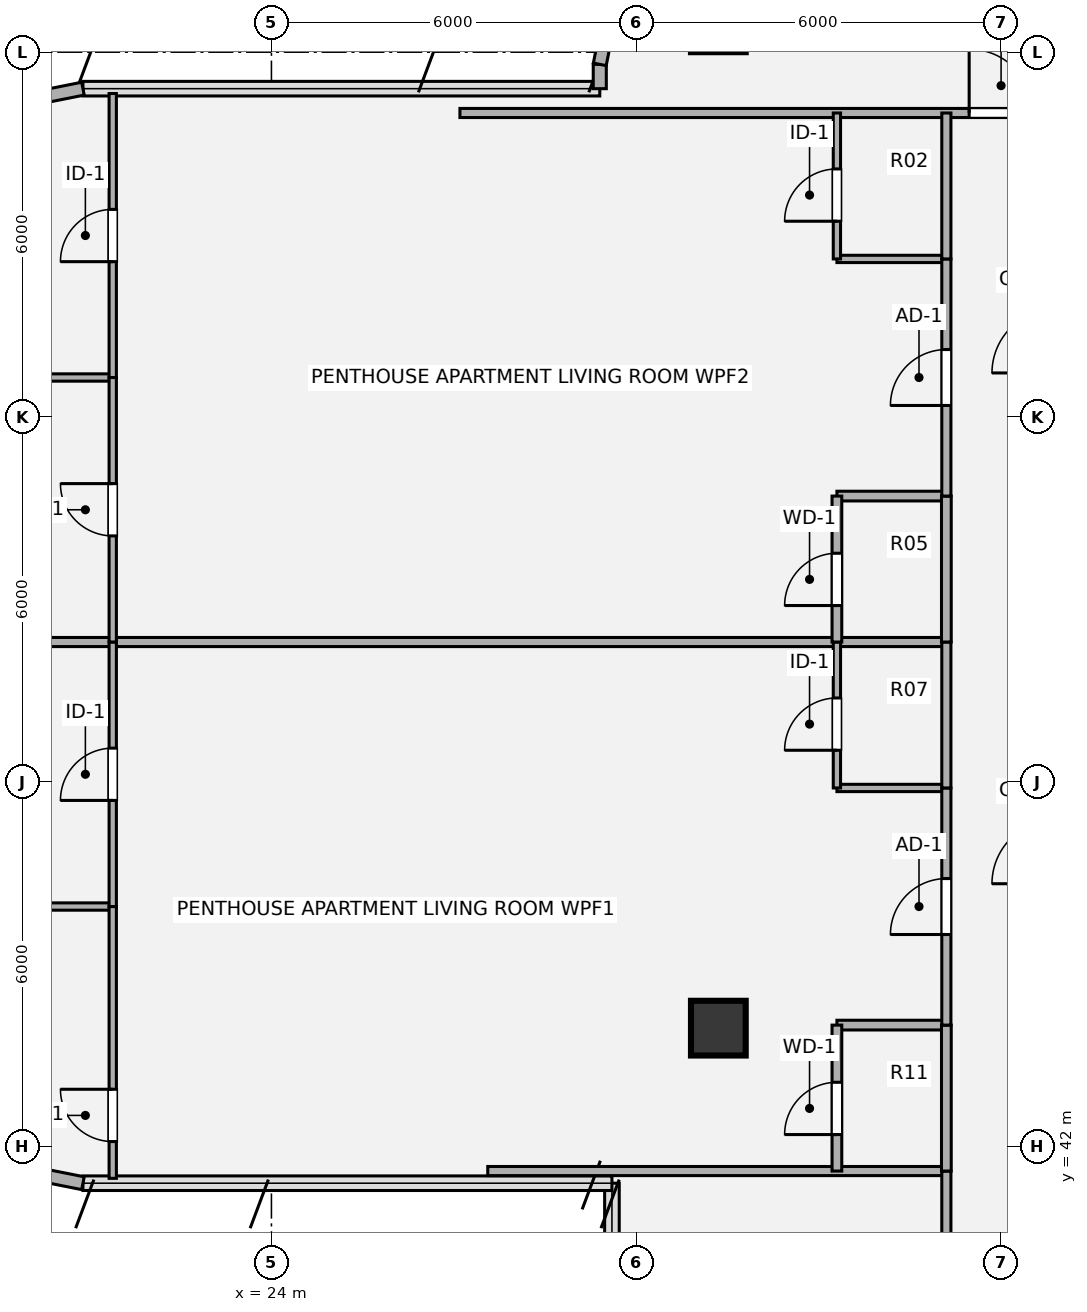
"""IFC4 building model, lengths in metres.
Left out: names, types, materials, properties, quantities, classifications, styles, units other than length and angle.
Written with IfcOpenShell. Run it as: python <this file> out.ifc"""

import sys

from ifc_helpers import new_model, si_unit, direction, frame, frame_2d, origin, origin_2d, place, context, subcontext, project, spatial, rectangle, hollow_circle, extrude, source, transform, mapped, element, fill, save


model = new_model("IFC4")
c1 = context("Model", 3, precision=1e-05, world=origin(), true_north=direction((0.0, 1.0)))
c2 = subcontext(c1, "Body", "Model", "MODEL_VIEW")
j1 = project(units=[si_unit("LENGTHUNIT", "METRE"), si_unit("PLANEANGLEUNIT", "RADIAN")], contexts=[c1])
p1 = place(None, origin())
s1 = spatial("IfcSite", under=j1, at=p1, CompositionType="ELEMENT")
p2 = place(p1, origin())
s2 = spatial("IfcBuilding", under=s1, at=p2, CompositionType="ELEMENT")
p3 = place(p2, frame((0.0, 0.0, 279.72)))
s3 = spatial("IfcBuildingStorey", under=s2, at=p3, CompositionType="ELEMENT", Elevation=279.72)
m1 = source(origin(), c2, "Body", "SweptSolid", [
    extrude(hollow_circle(Radius=0.45, WallThickness=0.032, at=origin_2d()), origin(), (0.0, 0.0, 1.0), 3.78),
])
p4 = place(p3, frame((31.35, 43.95, 0.0), z_axis=(0.0, 0.0, 1.0), x_axis=(1.0, 0.0, 0.0)))
e1 = element("IfcColumn", 1, at=p4, inside=s3, PredefinedType="COLUMN", context=c2, shape_type="MappedRepresentation", body=[
    mapped(m1, transform((0.0, 0.0, 0.0), x_axis=(1.0, 0.0, 0.0), y_axis=(0.0, 1.0, 0.0), z_axis=(0.0, 0.0, 1.0), scale=1.0)),
])
for number, where, z_axis, x_axis in (
    (2, (20.9, 41.4, 0.0), (0.0, 0.0, 1.0), (-0.981, 0.195, 0.0)),
    (3, (19.675, 59.156, 0.0), (0.0, 0.0, 1.0), (0.981, 0.195, 0.0)),
):
    element("IfcWall", number, at=place(p3, frame(where, z_axis=z_axis, x_axis=x_axis)), inside=s3, PredefinedType="SOLIDWALL", context=c2, shape_type="SweptSolid", body=[
        extrude(rectangle(XDim=1.249, YDim=0.215, at=frame_2d((0.624, 0.0))), origin(), (0.0, 0.0, 1.0), 3.53),
    ])
p5 = place(p3, frame((29.4, 59.4, 0.0), z_axis=(0.0, 0.0, 1.0), x_axis=(0.0, 1.0, 0.0)))
e4 = element("IfcWall", 4, at=p5, inside=s3, PredefinedType="SOLIDWALL", context=c2, shape_type="SweptSolid", body=[
    extrude(rectangle(XDim=0.4, YDim=0.215, at=frame_2d((0.2, 0.0))), origin(), (0.0, 0.0, 1.0), 3.53),
])
p6 = place(p3, frame((29.4, 59.8, 0.0), z_axis=(0.0, 0.0, 1.0), x_axis=(0.195190360752, 0.980765376158, 0.0)))
e5 = element("IfcWall", 5, at=p6, inside=s3, PredefinedType="SOLIDWALL", context=c2, shape_type="SweptSolid", body=[
    extrude(rectangle(XDim=1.014, YDim=0.215, at=frame_2d((0.507, 0.0))), origin(), (0.0, 0.0, 1.0), 3.53),
])
p7 = place(p3, frame((27.558, 41.6, 0.0), z_axis=(0.0, 0.0, 1.0), x_axis=(1.0, 0.0, 0.0)))
e6 = element("IfcWall", 6, at=p7, inside=s3, PredefinedType="PARTITIONING", context=c2, shape_type="SweptSolid", body=[
    extrude(rectangle(XDim=7.542, YDim=0.15, at=frame_2d((3.771, 0.0))), origin(), (0.0, 0.0, 1.0), 3.5),
])
p8 = place(p3, frame((33.3, 44.0, 0.0), z_axis=(0.0, 0.0, 1.0), x_axis=(1.0, 0.0, 0.0)))
e7 = element("IfcWall", 7, at=p8, inside=s3, PredefinedType="PLUMBINGWALL", context=c2, shape_type="SweptSolid", body=[
    extrude(rectangle(XDim=1.8, YDim=0.16, at=frame_2d((0.9, 0.0))), origin(), (0.0, 0.0, 1.0), 2.903),
])
p9 = place(p3, frame((17.78, 45.95, 0.0), z_axis=(0.0, 0.0, 1.0), x_axis=(1.0, 0.0, 0.0)))
e8 = element("IfcWall", 8, at=p9, inside=s3, PredefinedType="PARTITIONING", context=c2, shape_type="SweptSolid", body=[
    extrude(rectangle(XDim=3.61, YDim=0.12, at=frame_2d((1.805, 0.0))), origin(), (0.0, 0.0, 1.0), 2.982),
])
p10 = place(p3, frame((33.3, 47.9, 0.0), z_axis=(0.0, 0.0, 1.0), x_axis=(1.0, 0.0, 0.0)))
e9 = element("IfcWall", 9, at=p10, inside=s3, PredefinedType="PARTITIONING", context=c2, shape_type="SweptSolid", body=[
    extrude(rectangle(XDim=1.8, YDim=0.12, at=frame_2d((0.9, 0.0))), origin(), (0.0, 0.0, 1.0), 3.259),
])
p11 = place(p3, frame((17.78, 50.3, 0.0), z_axis=(0.0, 0.0, 1.0), x_axis=(1.0, 0.0, 0.0)))
e10 = element("IfcWall", 10, at=p11, inside=s3, PredefinedType="PARTITIONING", context=c2, shape_type="SweptSolid", body=[
    extrude(rectangle(XDim=17.32, YDim=0.15, at=frame_2d((8.66, 0.0))), origin(), (0.0, 0.0, 1.0), 2.982),
])
p12 = place(p3, frame((33.3, 52.7, 0.0), z_axis=(0.0, 0.0, 1.0), x_axis=(1.0, 0.0, 0.0)))
e11 = element("IfcWall", 11, at=p12, inside=s3, PredefinedType="PLUMBINGWALL", context=c2, shape_type="SweptSolid", body=[
    extrude(rectangle(XDim=1.8, YDim=0.16, at=frame_2d((0.9, 0.0))), origin(), (0.0, 0.0, 1.0), 3.259),
])
p13 = place(p3, frame((17.78, 54.65, 0.0), z_axis=(0.0, 0.0, 1.0), x_axis=(1.0, 0.0, 0.0)))
e12 = element("IfcWall", 12, at=p13, inside=s3, PredefinedType="PARTITIONING", context=c2, shape_type="SweptSolid", body=[
    extrude(rectangle(XDim=3.61, YDim=0.12, at=frame_2d((1.805, 0.0))), origin(), (0.0, 0.0, 1.0), 2.903),
])
p14 = place(p3, frame((33.3, 56.6, 0.0), z_axis=(0.0, 0.0, 1.0), x_axis=(1.0, 0.0, 0.0)))
e13 = element("IfcWall", 13, at=p14, inside=s3, PredefinedType="PARTITIONING", context=c2, shape_type="SweptSolid", body=[
    extrude(rectangle(XDim=1.8, YDim=0.12, at=frame_2d((0.9, 0.0))), origin(), (0.0, 0.0, 1.0), 3.259),
])
p15 = place(p3, frame((27.1, 59.0, 0.0), z_axis=(0.0, 0.0, 1.0), x_axis=(1.0, 0.0, 0.0)))
e14 = element("IfcWall", 14, at=p15, inside=s3, PredefinedType="PARTITIONING", context=c2, shape_type="SweptSolid", body=[
    extrude(rectangle(XDim=17.8, YDim=0.15, at=frame_2d((8.9, 0.0))), origin(), (0.0, 0.0, 1.0), 3.308),
])
p16 = place(p15, frame((8.375, 0.0, 0.0)))
e15 = element("IfcOpeningElement", 15, at=p16, cuts=e14, PredefinedType="OPENING", context=c2, shape_type="SweptSolid", body=[
    extrude(rectangle(XDim=1.05, YDim=2.1, at=origin_2d()), frame((0.525, 0.085, 1.05), z_axis=(0.0, -1.0, 0.0), x_axis=(1.0, 0.0, 0.0)), (0.0, 0.0, 1.0), 0.17),
])
p17 = place(p3, frame((21.39, 41.48, 0.0), z_axis=(0.0, 0.0, 1.0), x_axis=(0.0, 1.0, 0.0)))
e16 = element("IfcWall", 16, at=p17, inside=s3, PredefinedType="PARTITIONING", context=c2, shape_type="SweptSolid", body=[
    extrude(rectangle(XDim=4.47, YDim=0.12, at=frame_2d((2.235, 0.0))), origin(), (0.0, 0.0, 1.0), 3.5),
])
p18 = place(p17, frame((0.605, 0.0, 0.0)))
e17 = element("IfcOpeningElement", 17, at=p18, cuts=e16, PredefinedType="OPENING", context=c2, shape_type="SweptSolid", body=[
    extrude(rectangle(XDim=0.86, YDim=2.1, at=origin_2d()), frame((0.43, 0.07, 1.05), z_axis=(0.0, -1.0, 0.0), x_axis=(1.0, 0.0, 0.0)), (0.0, 0.0, 1.0), 0.14),
])
p19 = place(p3, frame((21.39, 45.95, 0.0), z_axis=(0.0, 0.0, 1.0), x_axis=(0.0, 1.0, 0.0)))
e18 = element("IfcWall", 18, at=p19, inside=s3, PredefinedType="PARTITIONING", context=c2, shape_type="SweptSolid", body=[
    extrude(rectangle(XDim=4.35, YDim=0.12, at=frame_2d((2.175, 0.0))), origin(), (0.0, 0.0, 1.0), 3.5),
])
p20 = place(p19, frame((1.745, 0.0, 0.0)))
e19 = element("IfcOpeningElement", 19, at=p20, cuts=e18, PredefinedType="OPENING", context=c2, shape_type="SweptSolid", body=[
    extrude(rectangle(XDim=0.86, YDim=2.1, at=origin_2d()), frame((0.43, 0.07, 1.05), z_axis=(0.0, -1.0, 0.0), x_axis=(1.0, 0.0, 0.0)), (0.0, 0.0, 1.0), 0.14),
])
p21 = place(p3, frame((21.39, 50.3, 0.0), z_axis=(0.0, 0.0, 1.0), x_axis=(0.0, 1.0, 0.0)))
e20 = element("IfcWall", 20, at=p21, inside=s3, PredefinedType="PARTITIONING", context=c2, shape_type="SweptSolid", body=[
    extrude(rectangle(XDim=4.35, YDim=0.12, at=frame_2d((2.175, 0.0))), origin(), (0.0, 0.0, 1.0), 3.5),
])
p22 = place(p21, frame((1.745, 0.0, 0.0)))
e21 = element("IfcOpeningElement", 21, at=p22, cuts=e20, PredefinedType="OPENING", context=c2, shape_type="SweptSolid", body=[
    extrude(rectangle(XDim=0.86, YDim=2.1, at=origin_2d()), frame((0.43, 0.07, 1.05), z_axis=(0.0, -1.0, 0.0), x_axis=(1.0, 0.0, 0.0)), (0.0, 0.0, 1.0), 0.14),
])
p23 = place(p3, frame((21.39, 54.65, 0.0), z_axis=(0.0, 0.0, 1.0), x_axis=(0.0, 1.0, 0.0)))
e22 = element("IfcWall", 22, at=p23, inside=s3, PredefinedType="PARTITIONING", context=c2, shape_type="SweptSolid", body=[
    extrude(rectangle(XDim=4.67, YDim=0.12, at=frame_2d((2.335, 0.0))), origin(), (0.0, 0.0, 1.0), 3.5),
])
p24 = place(p23, frame((1.905, 0.0, 0.0)))
e23 = element("IfcOpeningElement", 23, at=p24, cuts=e22, PredefinedType="OPENING", context=c2, shape_type="SweptSolid", body=[
    extrude(rectangle(XDim=0.86, YDim=2.1, at=origin_2d()), frame((0.43, 0.07, 1.05), z_axis=(0.0, -1.0, 0.0), x_axis=(1.0, 0.0, 0.0)), (0.0, 0.0, 1.0), 0.14),
])
p25 = place(p3, frame((33.3, 41.6, 0.0), z_axis=(0.0, 0.0, 1.0), x_axis=(0.0, 1.0, 0.0)))
e24 = element("IfcWall", 24, at=p25, inside=s3, PredefinedType="PLUMBINGWALL", context=c2, shape_type="SweptSolid", body=[
    extrude(rectangle(XDim=2.4, YDim=0.16, at=frame_2d((1.2, 0.0))), origin(), (0.0, 0.0, 1.0), 3.5),
])
p26 = place(p25, frame((0.6, 0.0, 0.0)))
e25 = element("IfcOpeningElement", 25, at=p26, cuts=e24, PredefinedType="OPENING", context=c2, shape_type="SweptSolid", body=[
    extrude(rectangle(XDim=0.86, YDim=2.1, at=origin_2d()), frame((0.43, 0.09, 1.05), z_axis=(0.0, -1.0, 0.0), x_axis=(1.0, 0.0, 0.0)), (0.0, 0.0, 1.0), 0.18),
])
p27 = place(p3, frame((33.3, 47.9, 0.0), z_axis=(0.0, 0.0, 1.0), x_axis=(0.0, 1.0, 0.0)))
e26 = element("IfcWall", 26, at=p27, inside=s3, PredefinedType="PARTITIONING", context=c2, shape_type="SweptSolid", body=[
    extrude(rectangle(XDim=2.4, YDim=0.12, at=frame_2d((1.2, 0.0))), origin(), (0.0, 0.0, 1.0), 3.5),
])
p28 = place(p27, frame((0.62, 0.0, 0.0)))
e27 = element("IfcOpeningElement", 27, at=p28, cuts=e26, PredefinedType="OPENING", context=c2, shape_type="SweptSolid", body=[
    extrude(rectangle(XDim=0.86, YDim=2.1, at=origin_2d()), frame((0.43, 0.07, 1.05), z_axis=(0.0, -1.0, 0.0), x_axis=(1.0, 0.0, 0.0)), (0.0, 0.0, 1.0), 0.14),
])
p29 = place(p3, frame((33.3, 50.3, 0.0), z_axis=(0.0, 0.0, 1.0), x_axis=(0.0, 1.0, 0.0)))
e28 = element("IfcWall", 28, at=p29, inside=s3, PredefinedType="PLUMBINGWALL", context=c2, shape_type="SweptSolid", body=[
    extrude(rectangle(XDim=2.4, YDim=0.16, at=frame_2d((1.2, 0.0))), origin(), (0.0, 0.0, 1.0), 3.5),
])
p30 = place(p29, frame((0.6, 0.0, 0.0)))
e29 = element("IfcOpeningElement", 29, at=p30, cuts=e28, PredefinedType="OPENING", context=c2, shape_type="SweptSolid", body=[
    extrude(rectangle(XDim=0.86, YDim=2.1, at=origin_2d()), frame((0.43, 0.09, 1.05), z_axis=(0.0, -1.0, 0.0), x_axis=(1.0, 0.0, 0.0)), (0.0, 0.0, 1.0), 0.18),
])
p31 = place(p3, frame((33.3, 56.6, 0.0), z_axis=(0.0, 0.0, 1.0), x_axis=(0.0, 1.0, 0.0)))
e30 = element("IfcWall", 30, at=p31, inside=s3, PredefinedType="PARTITIONING", context=c2, shape_type="SweptSolid", body=[
    extrude(rectangle(XDim=2.4, YDim=0.12, at=frame_2d((1.2, 0.0))), origin(), (0.0, 0.0, 1.0), 3.5),
])
p32 = place(p31, frame((0.62, 0.0, 0.0)))
e31 = element("IfcOpeningElement", 31, at=p32, cuts=e30, PredefinedType="OPENING", context=c2, shape_type="SweptSolid", body=[
    extrude(rectangle(XDim=0.86, YDim=2.1, at=origin_2d()), frame((0.43, 0.07, 1.05), z_axis=(0.0, -1.0, 0.0), x_axis=(1.0, 0.0, 0.0)), (0.0, 0.0, 1.0), 0.14),
])
p33 = place(p3, frame((35.1, 24.4, 0.0), z_axis=(0.0, 0.0, 1.0), x_axis=(0.0, 1.0, 0.0)))
e32 = element("IfcWall", 32, at=p33, inside=s3, PredefinedType="PARTITIONING", context=c2, shape_type="SweptSolid", body=[
    extrude(rectangle(XDim=17.2, YDim=0.15, at=frame_2d((8.6, 0.0))), origin(), (0.0, 0.0, 1.0), 3.5),
])
p34 = place(p33, frame((5.075, 0.0, 0.0)))
e33 = element("IfcOpeningElement", 33, at=p34, cuts=e32, PredefinedType="OPENING", context=c2, shape_type="SweptSolid", body=[
    extrude(rectangle(XDim=1.05, YDim=2.1, at=origin_2d()), frame((0.525, 0.085, 1.05), z_axis=(0.0, -1.0, 0.0), x_axis=(1.0, 0.0, 0.0)), (0.0, 0.0, 1.0), 0.17),
])
p35 = place(p3, frame((35.1, 41.6, 0.0), z_axis=(0.0, 0.0, 1.0), x_axis=(0.0, 1.0, 0.0)))
e34 = element("IfcWall", 34, at=p35, inside=s3, PredefinedType="PLUMBINGWALL", context=c2, shape_type="SweptSolid", body=[
    extrude(rectangle(XDim=2.4, YDim=0.16, at=frame_2d((1.2, 0.0))), origin(), (0.0, 0.0, 1.0), 3.5),
])
p36 = place(p3, frame((35.1, 44.0, 0.0), z_axis=(0.0, 0.0, 1.0), x_axis=(0.0, 1.0, 0.0)))
e35 = element("IfcWall", 35, at=p36, inside=s3, PredefinedType="PARTITIONING", context=c2, shape_type="SweptSolid", body=[
    extrude(rectangle(XDim=3.9, YDim=0.15, at=frame_2d((1.95, 0.0))), origin(), (0.0, 0.0, 1.0), 3.5),
])
p37 = place(p36, frame((1.49, 0.0, 0.0)))
e36 = element("IfcOpeningElement", 36, at=p37, cuts=e35, PredefinedType="OPENING", context=c2, shape_type="SweptSolid", body=[
    extrude(rectangle(XDim=0.92, YDim=2.1, at=origin_2d()), frame((0.46, 0.085, 1.05), z_axis=(0.0, -1.0, 0.0), x_axis=(1.0, 0.0, 0.0)), (0.0, 0.0, 1.0), 0.17),
])
p38 = place(p3, frame((35.1, 47.9, 0.0), z_axis=(0.0, 0.0, 1.0), x_axis=(0.0, 1.0, 0.0)))
e37 = element("IfcWall", 37, at=p38, inside=s3, PredefinedType="PARTITIONING", context=c2, shape_type="SweptSolid", body=[
    extrude(rectangle(XDim=2.4, YDim=0.15, at=frame_2d((1.2, 0.0))), origin(), (0.0, 0.0, 1.0), 3.5),
])
p39 = place(p3, frame((35.1, 50.3, 0.0), z_axis=(0.0, 0.0, 1.0), x_axis=(0.0, 1.0, 0.0)))
e38 = element("IfcWall", 38, at=p39, inside=s3, PredefinedType="PLUMBINGWALL", context=c2, shape_type="SweptSolid", body=[
    extrude(rectangle(XDim=2.4, YDim=0.16, at=frame_2d((1.2, 0.0))), origin(), (0.0, 0.0, 1.0), 3.5),
])
p40 = place(p3, frame((35.1, 52.7, 0.0), z_axis=(0.0, 0.0, 1.0), x_axis=(0.0, 1.0, 0.0)))
e39 = element("IfcWall", 39, at=p40, inside=s3, PredefinedType="PARTITIONING", context=c2, shape_type="SweptSolid", body=[
    extrude(rectangle(XDim=3.9, YDim=0.15, at=frame_2d((1.95, 0.0))), origin(), (0.0, 0.0, 1.0), 3.5),
])
p41 = place(p40, frame((1.49, 0.0, 0.0)))
e40 = element("IfcOpeningElement", 40, at=p41, cuts=e39, PredefinedType="OPENING", context=c2, shape_type="SweptSolid", body=[
    extrude(rectangle(XDim=0.92, YDim=2.1, at=origin_2d()), frame((0.46, 0.085, 1.05), z_axis=(0.0, -1.0, 0.0), x_axis=(1.0, 0.0, 0.0)), (0.0, 0.0, 1.0), 0.17),
])
p42 = place(p3, frame((35.1, 56.6, 0.0), z_axis=(0.0, 0.0, 1.0), x_axis=(0.0, 1.0, 0.0)))
e41 = element("IfcWall", 41, at=p42, inside=s3, PredefinedType="PARTITIONING", context=c2, shape_type="SweptSolid", body=[
    extrude(rectangle(XDim=2.4, YDim=0.15, at=frame_2d((1.2, 0.0))), origin(), (0.0, 0.0, 1.0), 3.5),
])
m2 = source(origin(), c2, "Body", "SweptSolid", [
    extrude(rectangle(XDim=1.05, YDim=2.1, at=origin_2d()), frame((0.525, 0.025, 1.05), z_axis=(0.0, -1.0, 0.0), x_axis=(1.0, 0.0, 0.0)), (0.0, 0.0, 1.0), 0.05),
])
p43 = place(p16, origin())
e42 = element("IfcDoor", 42, at=p43, inside=s3, OperationType="SINGLE_SWING_LEFT", PredefinedType="DOOR", context=c2, shape_type="MappedRepresentation", body=[
    mapped(m2, transform((0.0, 0.0, 0.0), x_axis=(1.0, 0.0, 0.0), y_axis=(0.0, 1.0, 0.0), z_axis=(0.0, 0.0, 1.0), scale=1.0)),
])
fill(e15, e42)
m3 = source(origin(), c2, "Body", "SweptSolid", [
    extrude(rectangle(XDim=0.86, YDim=2.1, at=origin_2d()), frame((0.43, 0.025, 1.05), z_axis=(0.0, -1.0, 0.0), x_axis=(1.0, 0.0, 0.0)), (0.0, 0.0, 1.0), 0.05),
])
p44 = place(p18, origin())
e43 = element("IfcDoor", 43, at=p44, inside=s3, OperationType="SINGLE_SWING_RIGHT", PredefinedType="DOOR", context=c2, shape_type="MappedRepresentation", body=[
    mapped(m3, transform((0.0, 0.0, 0.0), x_axis=(1.0, 0.0, 0.0), y_axis=(0.0, 1.0, 0.0), z_axis=(0.0, 0.0, 1.0), scale=1.0)),
])
fill(e17, e43)
p45 = place(p20, origin())
e44 = element("IfcDoor", 44, at=p45, inside=s3, OperationType="SINGLE_SWING_LEFT", PredefinedType="DOOR", context=c2, shape_type="MappedRepresentation", body=[
    mapped(m3, transform((0.0, 0.0, 0.0), x_axis=(1.0, 0.0, 0.0), y_axis=(0.0, 1.0, 0.0), z_axis=(0.0, 0.0, 1.0), scale=1.0)),
])
fill(e19, e44)
p46 = place(p22, origin())
e45 = element("IfcDoor", 45, at=p46, inside=s3, OperationType="SINGLE_SWING_RIGHT", PredefinedType="DOOR", context=c2, shape_type="MappedRepresentation", body=[
    mapped(m3, transform((0.0, 0.0, 0.0), x_axis=(1.0, 0.0, 0.0), y_axis=(0.0, 1.0, 0.0), z_axis=(0.0, 0.0, 1.0), scale=1.0)),
])
fill(e21, e45)
p47 = place(p24, origin())
e46 = element("IfcDoor", 46, at=p47, inside=s3, OperationType="SINGLE_SWING_LEFT", PredefinedType="DOOR", context=c2, shape_type="MappedRepresentation", body=[
    mapped(m3, transform((0.0, 0.0, 0.0), x_axis=(1.0, 0.0, 0.0), y_axis=(0.0, 1.0, 0.0), z_axis=(0.0, 0.0, 1.0), scale=1.0)),
])
fill(e23, e46)
m4 = source(origin(), c2, "Body", "SweptSolid", [
    extrude(rectangle(XDim=0.86, YDim=2.1, at=origin_2d()), frame((0.43, 0.025, 1.05), z_axis=(0.0, -1.0, 0.0), x_axis=(1.0, 0.0, 0.0)), (0.0, 0.0, 1.0), 0.05),
])
p48 = place(p26, origin())
e47 = element("IfcDoor", 47, at=p48, inside=s3, OperationType="SINGLE_SWING_LEFT", PredefinedType="DOOR", context=c2, shape_type="MappedRepresentation", body=[
    mapped(m4, transform((0.0, 0.0, 0.0), x_axis=(1.0, 0.0, 0.0), y_axis=(0.0, 1.0, 0.0), z_axis=(0.0, 0.0, 1.0), scale=1.0)),
])
fill(e25, e47)
p49 = place(p28, origin())
e48 = element("IfcDoor", 48, at=p49, inside=s3, OperationType="SINGLE_SWING_LEFT", PredefinedType="DOOR", context=c2, shape_type="MappedRepresentation", body=[
    mapped(m3, transform((0.0, 0.0, 0.0), x_axis=(1.0, 0.0, 0.0), y_axis=(0.0, 1.0, 0.0), z_axis=(0.0, 0.0, 1.0), scale=1.0)),
])
fill(e27, e48)
p50 = place(p30, origin())
e49 = element("IfcDoor", 49, at=p50, inside=s3, OperationType="SINGLE_SWING_LEFT", PredefinedType="DOOR", context=c2, shape_type="MappedRepresentation", body=[
    mapped(m4, transform((0.0, 0.0, 0.0), x_axis=(1.0, 0.0, 0.0), y_axis=(0.0, 1.0, 0.0), z_axis=(0.0, 0.0, 1.0), scale=1.0)),
])
fill(e29, e49)
p51 = place(p32, origin())
e50 = element("IfcDoor", 50, at=p51, inside=s3, OperationType="SINGLE_SWING_LEFT", PredefinedType="DOOR", context=c2, shape_type="MappedRepresentation", body=[
    mapped(m3, transform((0.0, 0.0, 0.0), x_axis=(1.0, 0.0, 0.0), y_axis=(0.0, 1.0, 0.0), z_axis=(0.0, 0.0, 1.0), scale=1.0)),
])
fill(e31, e50)
m5 = source(origin(), c2, "Body", "SweptSolid", [
    extrude(rectangle(XDim=0.92, YDim=2.1, at=origin_2d()), frame((0.46, 0.025, 1.05), z_axis=(0.0, -1.0, 0.0), x_axis=(1.0, 0.0, 0.0)), (0.0, 0.0, 1.0), 0.05),
])
p52 = place(p37, origin())
e51 = element("IfcDoor", 51, at=p52, inside=s3, OperationType="SINGLE_SWING_LEFT", PredefinedType="DOOR", context=c2, shape_type="MappedRepresentation", body=[
    mapped(m5, transform((0.0, 0.0, 0.0), x_axis=(1.0, 0.0, 0.0), y_axis=(0.0, 1.0, 0.0), z_axis=(0.0, 0.0, 1.0), scale=1.0)),
])
fill(e36, e51)
p53 = place(p41, origin())
e52 = element("IfcDoor", 52, at=p53, inside=s3, OperationType="SINGLE_SWING_LEFT", PredefinedType="DOOR", context=c2, shape_type="MappedRepresentation", body=[
    mapped(m5, transform((0.0, 0.0, 0.0), x_axis=(1.0, 0.0, 0.0), y_axis=(0.0, 1.0, 0.0), z_axis=(0.0, 0.0, 1.0), scale=1.0)),
])
fill(e40, e52)
save(model, sys.argv[1])
